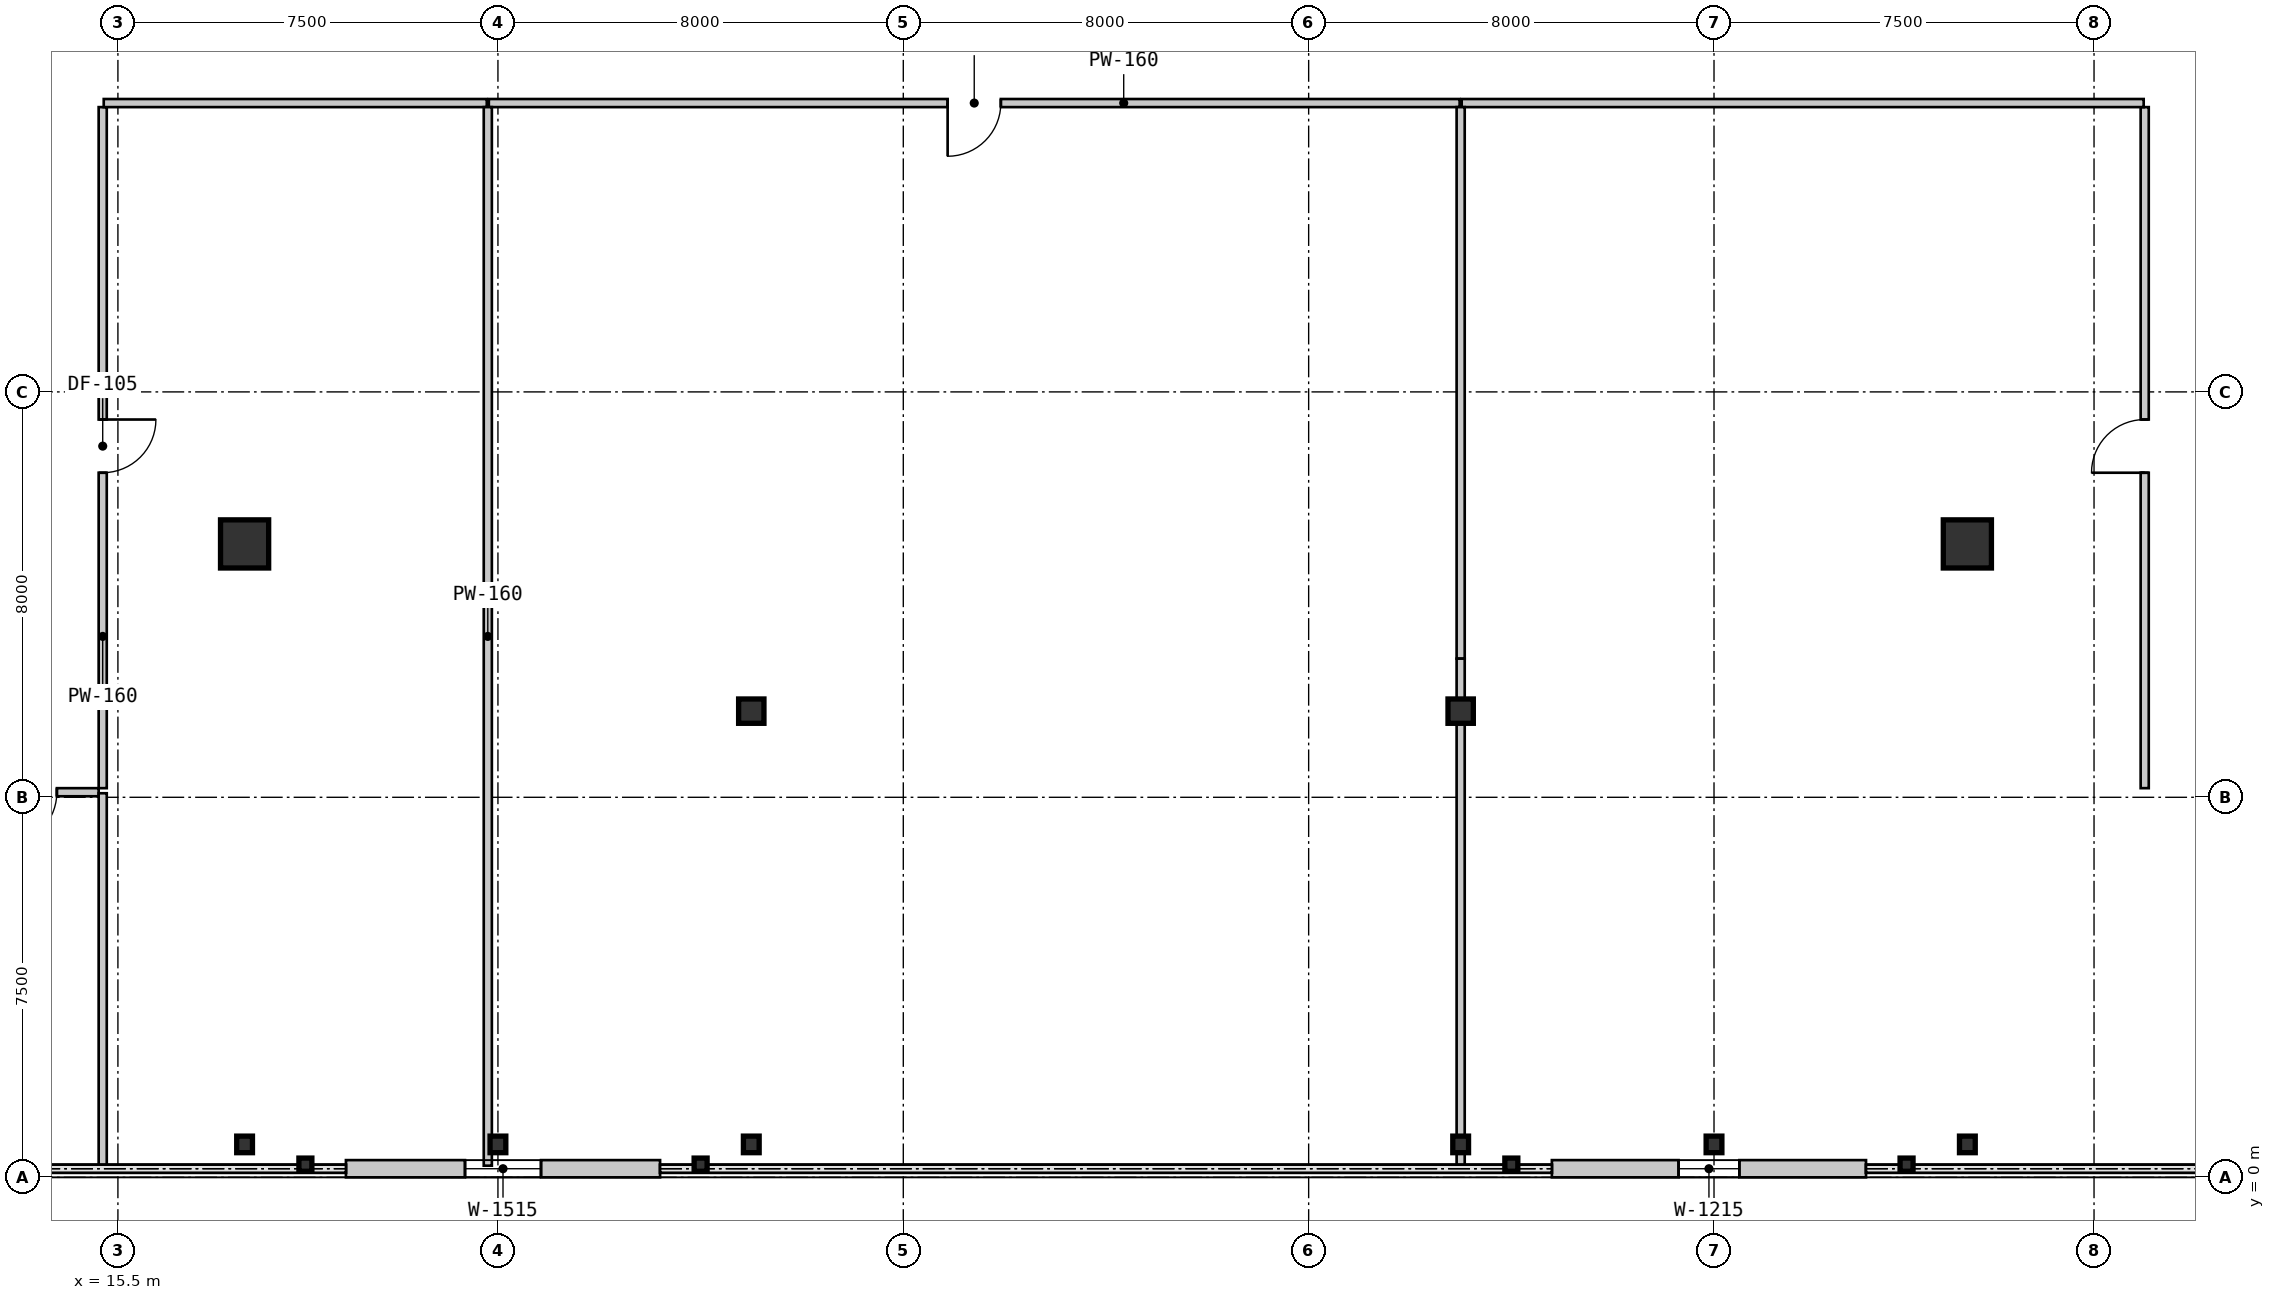
"""IFC4 building model, lengths in metres.
Left out: names, types, materials, properties, quantities, classifications, styles, units other than length and angle.
Written with IfcOpenShell. Run it as: python <this file> out.ifc"""

import sys

from ifc_helpers import new_model, si_unit, direction, frame, frame_2d, origin, origin_2d, place, context, subcontext, project, spatial, rectangle, i_section, extrude, source, transform, mapped, element, fill, save


model = new_model("IFC4")
c1 = context("Model", 3, precision=1e-05, world=origin(), true_north=direction((0.0, 1.0)))
c2 = subcontext(c1, "Body", "Model", "MODEL_VIEW")
j1 = project(units=[si_unit("LENGTHUNIT", "METRE"), si_unit("PLANEANGLEUNIT", "RADIAN")], contexts=[c1])
p1 = place(None, origin())
s1 = spatial("IfcSite", under=j1, at=p1, CompositionType="ELEMENT")
p2 = place(p1, origin())
s2 = spatial("IfcBuilding", under=s1, at=p2, CompositionType="ELEMENT")
p3 = place(p2, frame((0.0, 0.0, 8.4)))
s3 = spatial("IfcBuildingStorey", under=s2, at=p3, CompositionType="ELEMENT", Elevation=8.4)
m1 = source(origin(), c2, "Body", "SweptSolid", [
    extrude(i_section(OverallWidth=0.5, OverallDepth=0.48, WebThickness=0.028, FlangeThickness=0.044, at=origin_2d()), origin(), (0.0, 0.0, 1.0), 4.55),
])
for number, where, z_axis, x_axis in (
    (1, (28.0, 9.2, 0.0), (0.0, 0.0, 1.0), (1.0, 0.0, 0.0)),
    (2, (42.0, 9.2, 0.0), (0.0, 0.0, 1.0), (1.0, 0.0, 0.0)),
):
    element("IfcColumn", number, at=place(p3, frame(where, z_axis=z_axis, x_axis=x_axis)), inside=s3, PredefinedType="COLUMN", context=c2, shape_type="MappedRepresentation", body=[
        mapped(m1, transform((0.0, 0.0, 0.0), scale=1.0)),
    ])
m2 = source(origin(), c2, "Body", "SweptSolid", [
    extrude(rectangle(XDim=0.95, YDim=0.95, at=origin_2d()), origin(), (0.0, 0.0, 1.0), 4.55),
])
for number, where, z_axis, x_axis in (
    (3, (18.0, 12.5, 0.0), (0.0, 0.0, 1.0), (1.0, 0.0, 0.0)),
    (4, (52.0, 12.5, 0.0), (0.0, 0.0, 1.0), (1.0, 0.0, 0.0)),
):
    element("IfcColumn", number, at=place(p3, frame(where, z_axis=z_axis, x_axis=x_axis)), inside=s3, PredefinedType="COLUMN", context=c2, shape_type="MappedRepresentation", body=[
        mapped(m2, transform((0.0, 0.0, 0.0), scale=1.0)),
    ])
m3 = source(origin(), c2, "Body", "SweptSolid", [
    extrude(i_section(OverallWidth=0.311, OverallDepth=0.327, WebThickness=0.016, FlangeThickness=0.025, at=origin_2d()), origin(), (0.0, 0.0, 1.0), 4.55),
])
for number, where, z_axis, x_axis in (
    (5, (28.0, 0.65, 0.0), (0.0, 0.0, 1.0), (1.0, 0.0, 0.0)),
    (6, (42.0, 0.65, 0.0), (0.0, 0.0, 1.0), (1.0, 0.0, 0.0)),
    (7, (18.0, 0.65, 0.0), (0.0, 0.0, 1.0), (1.0, 0.0, 0.0)),
    (8, (23.0, 0.65, 0.0), (0.0, 0.0, 1.0), (1.0, 0.0, 0.0)),
    (9, (47.0, 0.65, 0.0), (0.0, 0.0, 1.0), (1.0, 0.0, 0.0)),
    (10, (52.0, 0.65, 0.0), (0.0, 0.0, 1.0), (1.0, 0.0, 0.0)),
):
    element("IfcColumn", number, at=place(p3, frame(where, z_axis=z_axis, x_axis=x_axis)), inside=s3, PredefinedType="COLUMN", context=c2, shape_type="MappedRepresentation", body=[
        mapped(m3, transform((0.0, 0.0, 0.0), scale=1.0)),
    ])
m4 = source(origin(), c2, "Body", "SweptSolid", [
    extrude(i_section(OverallWidth=0.256, OverallDepth=0.26, WebThickness=0.01, FlangeThickness=0.017, at=origin_2d()), origin(), (0.0, 0.0, 1.0), 4.55),
])
for number, where, z_axis, x_axis in (
    (11, (19.2, 0.25, 0.0), (0.0, 0.0, 1.0), (1.0, 0.0, 0.0)),
    (12, (27.0, 0.25, 0.0), (0.0, 0.0, 1.0), (1.0, 0.0, 0.0)),
    (13, (43.0, 0.25, 0.0), (0.0, 0.0, 1.0), (1.0, 0.0, 0.0)),
    (14, (50.8, 0.25, 0.0), (0.0, 0.0, 1.0), (1.0, 0.0, 0.0)),
):
    element("IfcColumn", number, at=place(p3, frame(where, z_axis=z_axis, x_axis=x_axis)), inside=s3, PredefinedType="PILASTER", context=c2, shape_type="MappedRepresentation", body=[
        mapped(m4, transform((0.0, 0.0, 0.0), scale=1.0)),
    ])
m5 = source(origin(), c2, "Body", "SweptSolid", [
    extrude(rectangle(XDim=6.2, YDim=0.34, at=frame_2d((3.1, 0.0))), origin(), (0.0, 0.0, 1.0), 4.29),
])
p4 = place(p3, frame((20.0, 0.17, 0.0), z_axis=(0.0, 0.0, 1.0), x_axis=(1.0, 0.0, 0.0)))
e15 = element("IfcWall", 15, at=p4, inside=s3, PredefinedType="SOLIDWALL", context=c2, shape_type="MappedRepresentation", body=[
    mapped(m5, transform((0.0, 0.0, 0.0), scale=1.0)),
])
m6 = source(origin(), c2, "Body", "SweptSolid", [
    extrude(rectangle(XDim=1.5, YDim=1.5, at=frame_2d((0.75, 0.75))), frame((0.0, 0.18, 0.0), z_axis=(0.0, -1.0, 0.0), x_axis=(1.0, 0.0, 0.0)), (0.0, 0.0, 1.0), 0.36),
])
p5 = place(p4, frame((2.35, 0.0, 0.9)))
e16 = element("IfcOpeningElement", 16, at=p5, cuts=e15, PredefinedType="OPENING", context=c2, shape_type="MappedRepresentation", body=[
    mapped(m6, transform((0.0, 0.0, 0.0), scale=1.0)),
])
p6 = place(p3, frame((43.8, 0.17, 0.0), z_axis=(0.0, 0.0, 1.0), x_axis=(1.0, 0.0, 0.0)))
e17 = element("IfcWall", 17, at=p6, inside=s3, PredefinedType="SOLIDWALL", context=c2, shape_type="MappedRepresentation", body=[
    mapped(m5, transform((0.0, 0.0, 0.0), scale=1.0)),
])
m7 = source(origin(), c2, "Body", "SweptSolid", [
    extrude(rectangle(XDim=1.2, YDim=1.5, at=frame_2d((0.6, 0.75))), frame((0.0, 0.18, 0.0), z_axis=(0.0, -1.0, 0.0), x_axis=(1.0, 0.0, 0.0)), (0.0, 0.0, 1.0), 0.36),
])
p7 = place(p6, frame((2.5, 0.0, 0.9)))
e18 = element("IfcOpeningElement", 18, at=p7, cuts=e17, PredefinedType="OPENING", context=c2, shape_type="MappedRepresentation", body=[
    mapped(m7, transform((0.0, 0.0, 0.0), scale=1.0)),
])
m8 = source(origin(), c2, "Body", "SweptSolid", [
    extrude(rectangle(XDim=13.44, YDim=0.16, at=frame_2d((6.72, 0.0))), origin(), (0.0, 0.0, 1.0), 4.29),
])
p8 = place(p3, frame((15.2, 21.12, 0.0), z_axis=(0.0, 0.0, 1.0), x_axis=(0.0, -1.0, 0.0)))
e19 = element("IfcWall", 19, at=p8, inside=s3, PredefinedType="PARTITIONING", context=c2, shape_type="MappedRepresentation", body=[
    mapped(m8, transform((0.0, 0.0, 0.0), scale=1.0)),
])
m9 = source(origin(), c2, "Body", "SweptSolid", [
    extrude(rectangle(XDim=1.05, YDim=2.1, at=frame_2d((0.525, 1.05))), frame((0.0, 0.09, 0.0), z_axis=(0.0, -1.0, 0.0), x_axis=(1.0, 0.0, 0.0)), (0.0, 0.0, 1.0), 0.18),
])
p9 = place(p8, frame((6.165, 0.0, 0.0)))
e20 = element("IfcOpeningElement", 20, at=p9, cuts=e19, PredefinedType="OPENING", context=c2, shape_type="MappedRepresentation", body=[
    mapped(m9, transform((0.0, 0.0, 0.0), scale=1.0)),
])
m10 = source(origin(), c2, "Body", "SweptSolid", [
    extrude(rectangle(XDim=7.56, YDim=0.16, at=frame_2d((3.78, 0.0))), origin(), (0.0, 0.0, 1.0), 4.29),
])
p10 = place(p3, frame((22.78, 21.2, 0.0), z_axis=(0.0, 0.0, 1.0), x_axis=(-1.0, 0.0, 0.0)))
e21 = element("IfcWall", 21, at=p10, inside=s3, PredefinedType="PARTITIONING", context=c2, shape_type="MappedRepresentation", body=[
    mapped(m10, transform((0.0, 0.0, 0.0), scale=1.0)),
])
m11 = source(origin(), c2, "Body", "SweptSolid", [
    extrude(rectangle(XDim=19.159, YDim=0.16, at=frame_2d((9.58, 0.0))), origin(), (0.0, 0.0, 1.0), 4.29),
])
p11 = place(p3, frame((41.98, 21.2, 0.0), z_axis=(0.0, 0.0, 1.0), x_axis=(-1.0, 0.0, 0.0)))
e22 = element("IfcWall", 22, at=p11, inside=s3, PredefinedType="PARTITIONING", context=c2, shape_type="MappedRepresentation", body=[
    mapped(m11, transform((0.0, 0.0, 0.0), scale=1.0)),
])
p12 = place(p11, frame((9.055, 0.0, 0.0)))
e23 = element("IfcOpeningElement", 23, at=p12, cuts=e22, PredefinedType="OPENING", context=c2, shape_type="MappedRepresentation", body=[
    mapped(m9, transform((0.0, 0.0, 0.0), scale=1.0)),
])
p13 = place(p3, frame((55.5, 7.68, 0.0), z_axis=(0.0, 0.0, 1.0), x_axis=(0.0, 1.0, 0.0)))
e24 = element("IfcWall", 24, at=p13, inside=s3, PredefinedType="PARTITIONING", context=c2, shape_type="MappedRepresentation", body=[
    mapped(m8, transform((0.0, 0.0, 0.0), scale=1.0)),
])
p14 = place(p13, frame((6.225, 0.0, 0.0)))
e25 = element("IfcOpeningElement", 25, at=p14, cuts=e24, PredefinedType="OPENING", context=c2, shape_type="MappedRepresentation", body=[
    mapped(m9, transform((0.0, 0.0, 0.0), scale=1.0)),
])
m12 = source(origin(), c2, "Body", "SweptSolid", [
    extrude(rectangle(XDim=13.459, YDim=0.16, at=frame_2d((6.73, 0.0))), origin(), (0.0, 0.0, 1.0), 4.29),
])
p15 = place(p3, frame((55.48, 21.2, 0.0), z_axis=(0.0, 0.0, 1.0), x_axis=(-1.0, 0.0, 0.0)))
e26 = element("IfcWall", 26, at=p15, inside=s3, PredefinedType="PARTITIONING", context=c2, shape_type="MappedRepresentation", body=[
    mapped(m12, transform((0.0, 0.0, 0.0), scale=1.0)),
])
m13 = source(origin(), c2, "Body", "SweptSolid", [
    extrude(rectangle(XDim=2.67, YDim=0.16, at=frame_2d((1.335, 0.0))), origin(), (0.0, 0.0, 1.0), 4.29),
])
p16 = place(p3, frame((15.12, 7.6, 0.0), z_axis=(0.0, 0.0, 1.0), x_axis=(-1.0, 0.0, 0.0)))
e27 = element("IfcWall", 27, at=p16, inside=s3, PredefinedType="PARTITIONING", context=c2, shape_type="MappedRepresentation", body=[
    mapped(m13, transform((0.0, 0.0, 0.0), scale=1.0)),
])
p17 = place(p16, frame((0.825, 0.0, 0.0)))
e28 = element("IfcOpeningElement", 28, at=p17, cuts=e27, PredefinedType="OPENING", context=c2, shape_type="MappedRepresentation", body=[
    mapped(m9, transform((0.0, 0.0, 0.0), scale=1.0)),
])
m14 = source(origin(), c2, "Body", "SweptSolid", [
    extrude(rectangle(XDim=20.89, YDim=0.16, at=frame_2d((10.445, 0.0))), origin(), (0.0, 0.0, 1.0), 4.29),
])
p18 = place(p3, frame((22.8, 21.12, 0.0), z_axis=(0.0, 0.0, 1.0), x_axis=(0.0, -1.0, 0.0)))
e29 = element("IfcWall", 29, at=p18, inside=s3, PredefinedType="PARTITIONING", context=c2, shape_type="MappedRepresentation", body=[
    mapped(m14, transform((0.0, 0.0, 0.0), scale=1.0)),
])
m15 = source(origin(), c2, "Body", "SweptSolid", [
    extrude(rectangle(XDim=7.35, YDim=0.16, at=frame_2d((3.675, 0.0))), origin(), (0.0, 0.0, 1.0), 4.29),
])
p19 = place(p3, frame((15.2, 0.23, 0.0), z_axis=(0.0, 0.0, 1.0), x_axis=(0.0, 1.0, 0.0)))
e30 = element("IfcWall", 30, at=p19, inside=s3, PredefinedType="PARTITIONING", context=c2, shape_type="MappedRepresentation", body=[
    mapped(m15, transform((0.0, 0.0, 0.0), scale=1.0)),
])
m16 = source(origin(), c2, "Body", "SweptSolid", [
    extrude(rectangle(XDim=10.884, YDim=0.16, at=frame_2d((5.442, 0.0))), origin(), (0.0, 0.0, 1.0), 4.29),
])
p20 = place(p3, frame((42.0, 21.12, 0.0), z_axis=(0.0, 0.0, 1.0), x_axis=(0.0, -1.0, 0.0)))
e31 = element("IfcWall", 31, at=p20, inside=s3, PredefinedType="PARTITIONING", context=c2, shape_type="MappedRepresentation", body=[
    mapped(m16, transform((0.0, 0.0, 0.0), scale=1.0)),
])
m17 = source(origin(), c2, "Body", "SweptSolid", [
    extrude(rectangle(XDim=1.051, YDim=0.16, at=frame_2d((0.526, 0.0))), origin(), (0.0, 0.0, 1.0), 3.688),
])
p21 = place(p3, frame((42.0, 10.236, 0.0), z_axis=(0.0, 0.0, 1.0), x_axis=(0.0, -1.0, 0.0)))
e32 = element("IfcWall", 32, at=p21, inside=s3, PredefinedType="PARTITIONING", context=c2, shape_type="MappedRepresentation", body=[
    mapped(m17, transform((0.0, 0.0, 0.0), scale=1.0)),
])
m18 = source(origin(), c2, "Body", "SweptSolid", [
    extrude(rectangle(XDim=8.535, YDim=0.16, at=frame_2d((4.268, 0.0))), origin(), (0.0, 0.0, 1.0), 3.757),
])
p22 = place(p3, frame((42.0, 9.185, 0.0), z_axis=(0.0, 0.0, 1.0), x_axis=(0.0, -1.0, 0.0)))
e33 = element("IfcWall", 33, at=p22, inside=s3, PredefinedType="PARTITIONING", context=c2, shape_type="MappedRepresentation", body=[
    mapped(m18, transform((0.0, 0.0, 0.0), scale=1.0)),
])
m19 = source(origin(), c2, "Body", "SweptSolid", [
    extrude(rectangle(XDim=0.42, YDim=0.16, at=frame_2d((0.21, 0.0))), origin(), (0.0, 0.0, 1.0), 4.29),
])
p23 = place(p3, frame((42.0, 0.65, 0.0), z_axis=(0.0, 0.0, 1.0), x_axis=(0.0, -1.0, 0.0)))
e34 = element("IfcWall", 34, at=p23, inside=s3, PredefinedType="PARTITIONING", context=c2, shape_type="MappedRepresentation", body=[
    mapped(m19, transform((0.0, 0.0, 0.0), scale=1.0)),
])
m20 = source(origin(), c2, "Body", "SweptSolid", [
    extrude(rectangle(XDim=1.5, YDim=1.5, at=frame_2d((0.75, 0.75))), frame((0.0, 0.03, 0.0), z_axis=(0.0, -1.0, 0.0), x_axis=(1.0, 0.0, 0.0)), (0.0, 0.0, 1.0), 0.06),
])
p24 = place(p5, origin())
e35 = element("IfcWindow", 35, at=p24, inside=s3, PartitioningType="SINGLE_PANEL", PredefinedType="WINDOW", context=c2, shape_type="MappedRepresentation", body=[
    mapped(m20, transform((0.0, 0.0, 0.0), scale=1.0)),
])
fill(e16, e35)
m21 = source(origin(), c2, "Body", "SweptSolid", [
    extrude(rectangle(XDim=1.2, YDim=1.5, at=frame_2d((0.6, 0.75))), frame((0.0, 0.03, 0.0), z_axis=(0.0, -1.0, 0.0), x_axis=(1.0, 0.0, 0.0)), (0.0, 0.0, 1.0), 0.06),
])
p25 = place(p7, origin())
e36 = element("IfcWindow", 36, at=p25, inside=s3, PartitioningType="SINGLE_PANEL", PredefinedType="WINDOW", context=c2, shape_type="MappedRepresentation", body=[
    mapped(m21, transform((0.0, 0.0, 0.0), scale=1.0)),
])
fill(e18, e36)
m22 = source(origin(), c2, "Body", "SweptSolid", [
    extrude(rectangle(XDim=1.05, YDim=2.1, at=frame_2d((0.525, 1.05))), frame((0.0, 0.025, 0.0), z_axis=(0.0, -1.0, 0.0), x_axis=(1.0, 0.0, 0.0)), (0.0, 0.0, 1.0), 0.05),
])
p26 = place(p9, origin())
e37 = element("IfcDoor", 37, at=p26, inside=s3, OperationType="SINGLE_SWING_LEFT", PredefinedType="DOOR", context=c2, shape_type="MappedRepresentation", body=[
    mapped(m22, transform((0.0, 0.0, 0.0), scale=1.0)),
])
fill(e20, e37)
p27 = place(p12, origin())
e38 = element("IfcDoor", 38, at=p27, inside=s3, OperationType="SINGLE_SWING_RIGHT", PredefinedType="DOOR", context=c2, shape_type="MappedRepresentation", body=[
    mapped(m22, transform((0.0, 0.0, 0.0), scale=1.0)),
])
fill(e23, e38)
p28 = place(p14, origin())
e39 = element("IfcDoor", 39, at=p28, inside=s3, OperationType="SINGLE_SWING_LEFT", PredefinedType="DOOR", context=c2, shape_type="MappedRepresentation", body=[
    mapped(m22, transform((0.0, 0.0, 0.0), scale=1.0)),
])
fill(e25, e39)
p29 = place(p17, origin())
e40 = element("IfcDoor", 40, at=p29, inside=s3, OperationType="SINGLE_SWING_RIGHT", PredefinedType="DOOR", context=c2, shape_type="MappedRepresentation", body=[
    mapped(m22, transform((0.0, 0.0, 0.0), scale=1.0)),
])
fill(e28, e40)
save(model, sys.argv[1])
